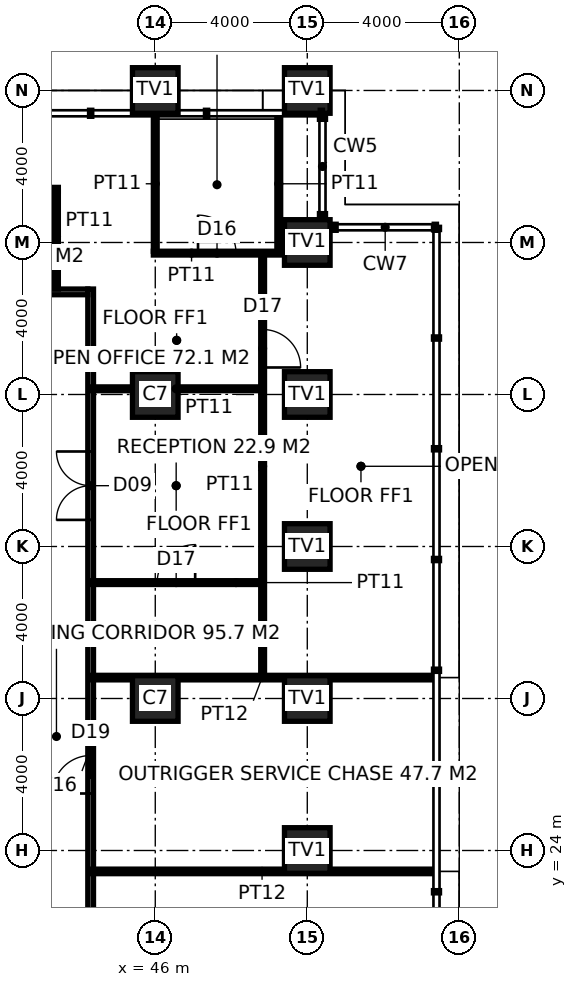
"""IFC4 building model, lengths in metres.
Left out: names, types, materials, properties, quantities, classifications, styles, units other than length and angle.
Written with IfcOpenShell. Run it as: python <this file> out.ifc"""

import sys

from ifc_helpers import new_model, si_unit, direction, frame, frame_2d, origin, origin_2d, place, context, subcontext, project, spatial, rectangle, hollow_rectangle, extrude, element, fill, save


model = new_model("IFC4")
c1 = context("Model", 3, precision=1e-05, world=origin(), true_north=direction((0.0, 1.0)))
c2 = subcontext(c1, "Body", "Model", "MODEL_VIEW")
j1 = project(units=[si_unit("LENGTHUNIT", "METRE"), si_unit("PLANEANGLEUNIT", "RADIAN")], contexts=[c1])
p1 = place(None, origin())
s1 = spatial("IfcSite", under=j1, at=p1, CompositionType="ELEMENT")
p2 = place(p1, origin())
s2 = spatial("IfcBuilding", under=s1, at=p2, CompositionType="ELEMENT")
p3 = place(p2, frame((0.0, 0.0, 11.0)))
s3 = spatial("IfcBuildingStorey", under=s2, at=p3, CompositionType="ELEMENT", Elevation=11.0)
for number, where, z_axis, x_axis in (
    (1, (46.0, 44.0, 0.0), (0.0, 0.0, 1.0), (1.0, 0.0, 0.0)),
    (2, (50.0, 44.0, 0.0), (0.0, 0.0, 1.0), (1.0, 0.0, 0.0)),
    (3, (50.0, 24.0, 0.0), (0.0, 0.0, 1.0), (1.0, 0.0, 0.0)),
    (4, (50.0, 28.0, 0.0), (0.0, 0.0, 1.0), (1.0, 0.0, 0.0)),
    (5, (50.0, 32.0, 0.0), (0.0, 0.0, 1.0), (1.0, 0.0, 0.0)),
    (6, (50.0, 36.0, 0.0), (0.0, 0.0, 1.0), (1.0, 0.0, 0.0)),
    (7, (50.0, 40.0, 0.0), (0.0, 0.0, 1.0), (1.0, 0.0, 0.0)),
):
    element("IfcColumn", number, at=place(p3, frame(where, z_axis=z_axis, x_axis=x_axis)), inside=s3, PredefinedType="USERDEFINED", context=c2, shape_type="SweptSolid", body=[
        extrude(hollow_rectangle(XDim=1.2, YDim=1.2, WallThickness=0.1, at=origin_2d()), origin(), (0.0, 0.0, 1.0), 4.0),
    ])
for number, where, z_axis, x_axis in (
    (8, (46.0, 28.0, 0.0), (0.0, 0.0, 1.0), (1.0, 0.0, 0.0)),
    (9, (46.0, 36.0, 0.0), (0.0, 0.0, 1.0), (1.0, 0.0, 0.0)),
):
    element("IfcColumn", number, at=place(p3, frame(where, z_axis=z_axis, x_axis=x_axis)), inside=s3, PredefinedType="COLUMN", context=c2, shape_type="SweptSolid", body=[
        extrude(hollow_rectangle(XDim=1.2, YDim=1.2, WallThickness=0.1, at=origin_2d()), origin(), (0.0, 0.0, 1.0), 4.0),
    ])
p4 = place(p3, frame((44.3, 14.625, 0.0), z_axis=(0.0, 0.0, 1.0), x_axis=(0.0, 1.0, 0.0)))
e10 = element("IfcWall", 10, at=p4, inside=s3, PredefinedType="PARTITIONING", context=c2, shape_type="SweptSolid", body=[
    extrude(rectangle(XDim=24.15, YDim=0.15, at=frame_2d((12.075, 0.0))), origin(), (0.0, 0.0, 1.0), 3.85),
])
p5 = place(p4, frame((2.824, 0.0, 0.0)))
e11 = element("IfcOpeningElement", 11, at=p5, cuts=e10, PredefinedType="OPENING", context=c2, shape_type="SweptSolid", body=[
    extrude(rectangle(XDim=1.8, YDim=2.4, at=frame_2d((0.9, 1.2))), frame((0.0, 0.085, 0.0), z_axis=(0.0, -1.0, 0.0), x_axis=(1.0, 0.0, 0.0)), (0.0, 0.0, 1.0), 0.17),
])
p6 = place(p4, frame((18.075, 0.0, 0.0)))
e12 = element("IfcOpeningElement", 12, at=p6, cuts=e10, PredefinedType="OPENING", context=c2, shape_type="SweptSolid", body=[
    extrude(rectangle(XDim=1.8, YDim=2.4, at=frame_2d((0.9, 1.2))), frame((0.0, 0.085, 0.0), z_axis=(0.0, -1.0, 0.0), x_axis=(1.0, 0.0, 0.0)), (0.0, 0.0, 1.0), 0.17),
])
p7 = place(p4, frame((10.875, 0.0, 0.0)))
e13 = element("IfcOpeningElement", 13, at=p7, cuts=e10, PredefinedType="OPENING", context=c2, shape_type="SweptSolid", body=[
    extrude(rectangle(XDim=1.0, YDim=2.2, at=frame_2d((0.5, 1.1))), frame((0.0, 0.085, 0.0), z_axis=(0.0, -1.0, 0.0), x_axis=(1.0, 0.0, 0.0)), (0.0, 0.0, 1.0), 0.17),
])
p8 = place(p3, frame((15.775, 38.7, 0.0), z_axis=(0.0, 0.0, 1.0), x_axis=(1.0, 0.0, 0.0)))
e14 = element("IfcWall", 14, at=p8, inside=s3, PredefinedType="PARTITIONING", context=c2, shape_type="SweptSolid", body=[
    extrude(rectangle(XDim=28.45, YDim=0.15, at=frame_2d((14.225, 0.0))), origin(), (0.0, 0.0, 1.0), 3.85),
])
p9 = place(p8, frame((7.975, 0.0, 0.0)))
e15 = element("IfcOpeningElement", 15, at=p9, cuts=e14, PredefinedType="OPENING", context=c2, shape_type="SweptSolid", body=[
    extrude(rectangle(XDim=0.9, YDim=2.1, at=frame_2d((0.45, 1.05))), frame((0.0, 0.085, 0.0), z_axis=(0.0, -1.0, 0.0), x_axis=(1.0, 0.0, 0.0)), (0.0, 0.0, 1.0), 0.17),
])
p10 = place(p8, frame((11.725, 0.0, 0.0)))
e16 = element("IfcOpeningElement", 16, at=p10, cuts=e14, PredefinedType="OPENING", context=c2, shape_type="SweptSolid", body=[
    extrude(rectangle(XDim=1.0, YDim=2.1, at=frame_2d((0.5, 1.05))), frame((0.0, 0.085, 0.0), z_axis=(0.0, -1.0, 0.0), x_axis=(1.0, 0.0, 0.0)), (0.0, 0.0, 1.0), 0.17),
])
p11 = place(p8, frame((15.575, 0.0, 0.0)))
e17 = element("IfcOpeningElement", 17, at=p11, cuts=e14, PredefinedType="OPENING", context=c2, shape_type="SweptSolid", body=[
    extrude(rectangle(XDim=0.9, YDim=2.1, at=frame_2d((0.45, 1.05))), frame((0.0, 0.085, 0.0), z_axis=(0.0, -1.0, 0.0), x_axis=(1.0, 0.0, 0.0)), (0.0, 0.0, 1.0), 0.17),
])
for number, where, z_axis, x_axis in (
    (18, (44.3, 23.45, 0.0), (0.0, 0.0, 1.0), (1.0, 0.0, 0.0)),
    (19, (44.3, 28.55, 0.0), (0.0, 0.0, 1.0), (1.0, 0.0, 0.0)),
):
    element("IfcWall", number, at=place(p3, frame(where, z_axis=z_axis, x_axis=x_axis)), inside=s3, PredefinedType="PARTITIONING", context=c2, shape_type="SweptSolid", body=[
        extrude(rectangle(XDim=9.02, YDim=0.12, at=frame_2d((4.51, 0.0))), origin(), (0.0, 0.0, 1.0), 3.85),
    ])
p12 = place(p3, frame((45.95, 39.72, 0.0), z_axis=(0.0, 0.0, 1.0), x_axis=(1.0, 0.0, 0.0)))
e20 = element("IfcWall", 20, at=p12, inside=s3, PredefinedType="PARTITIONING", context=c2, shape_type="SweptSolid", body=[
    extrude(rectangle(XDim=3.35, YDim=0.1, at=frame_2d((1.675, 0.0))), origin(), (0.0, 0.0, 1.0), 3.85),
])
p13 = place(p12, frame((1.175, 0.0, 0.0)))
e21 = element("IfcOpeningElement", 21, at=p13, cuts=e20, PredefinedType="OPENING", context=c2, shape_type="SweptSolid", body=[
    extrude(rectangle(XDim=1.0, YDim=2.2, at=frame_2d((0.5, 1.1))), frame((0.0, 0.06, 0.0), z_axis=(0.0, -1.0, 0.0), x_axis=(1.0, 0.0, 0.0)), (0.0, 0.0, 1.0), 0.12),
])
p14 = place(p3, frame((40.25, 41.4, 0.0), z_axis=(0.0, 0.0, 1.0), x_axis=(1.0, 0.0, 0.0)))
e22 = element("IfcWall", 22, at=p14, inside=s3, PredefinedType="PARTITIONING", context=c2, shape_type="SweptSolid", body=[
    extrude(rectangle(XDim=3.2, YDim=0.1, at=frame_2d((1.6, 0.0))), origin(), (0.0, 0.0, 1.0), 3.85),
])
p15 = place(p14, frame((1.1, 0.0, 0.0)))
e23 = element("IfcOpeningElement", 23, at=p15, cuts=e22, PredefinedType="OPENING", context=c2, shape_type="SweptSolid", body=[
    extrude(rectangle(XDim=1.0, YDim=2.2, at=frame_2d((0.5, 1.1))), frame((0.0, 0.06, 0.0), z_axis=(0.0, -1.0, 0.0), x_axis=(1.0, 0.0, 0.0)), (0.0, 0.0, 1.0), 0.12),
])
p16 = place(p3, frame((43.4, 38.775, 0.0), z_axis=(0.0, 0.0, 1.0), x_axis=(0.0, 1.0, 0.0)))
e24 = element("IfcWall", 24, at=p16, inside=s3, PredefinedType="PARTITIONING", context=c2, shape_type="SweptSolid", body=[
    extrude(rectangle(XDim=2.575, YDim=0.1, at=frame_2d((1.288, 0.0))), origin(), (0.0, 0.0, 1.0), 3.85),
])
p17 = place(p3, frame((46.0, 39.77, 0.0), z_axis=(0.0, 0.0, 1.0), x_axis=(0.0, 1.0, 0.0)))
e25 = element("IfcWall", 25, at=p17, inside=s3, PredefinedType="PARTITIONING", context=c2, shape_type="SweptSolid", body=[
    extrude(rectangle(XDim=3.55, YDim=0.1, at=frame_2d((1.775, 0.0))), origin(), (0.0, 0.0, 1.0), 2.85),
])
p18 = place(p3, frame((49.25, 39.77, 0.0), z_axis=(0.0, 0.0, 1.0), x_axis=(0.0, 1.0, 0.0)))
e26 = element("IfcWall", 26, at=p18, inside=s3, PredefinedType="PARTITIONING", context=c2, shape_type="SweptSolid", body=[
    extrude(rectangle(XDim=3.55, YDim=0.1, at=frame_2d((1.775, 0.0))), origin(), (0.0, 0.0, 1.0), 3.85),
])
p19 = place(p3, frame((48.825, 39.67, 0.0), z_axis=(0.0, 0.0, 1.0), x_axis=(0.0, -1.0, 0.0)))
e27 = element("IfcWall", 27, at=p19, inside=s3, PredefinedType="PARTITIONING", context=c2, shape_type="SweptSolid", body=[
    extrude(rectangle(XDim=11.119, YDim=0.1, at=frame_2d((5.56, 0.0))), origin(), (0.0, 0.0, 1.0), 3.85),
])
p20 = place(p19, frame((1.959, 0.0, 0.0)))
e28 = element("IfcOpeningElement", 28, at=p20, cuts=e27, PredefinedType="OPENING", context=c2, shape_type="SweptSolid", body=[
    extrude(rectangle(XDim=1.0, YDim=2.2, at=frame_2d((0.5, 1.1))), frame((0.0, 0.06, 0.0), z_axis=(0.0, -1.0, 0.0), x_axis=(1.0, 0.0, 0.0)), (0.0, 0.0, 1.0), 0.12),
])
p21 = place(p3, frame((44.3, 31.05, 0.0), z_axis=(0.0, 0.0, 1.0), x_axis=(1.0, 0.0, 0.0)))
e29 = element("IfcWall", 29, at=p21, inside=s3, PredefinedType="PARTITIONING", context=c2, shape_type="SweptSolid", body=[
    extrude(rectangle(XDim=4.5, YDim=0.1, at=frame_2d((2.25, 0.0))), origin(), (0.0, 0.0, 1.0), 3.85),
])
p22 = place(p21, frame((1.75, 0.0, 0.0)))
e30 = element("IfcOpeningElement", 30, at=p22, cuts=e29, PredefinedType="OPENING", context=c2, shape_type="SweptSolid", body=[
    extrude(rectangle(XDim=1.0, YDim=2.2, at=frame_2d((0.5, 1.1))), frame((0.0, 0.06, 0.0), z_axis=(0.0, -1.0, 0.0), x_axis=(1.0, 0.0, 0.0)), (0.0, 0.0, 1.0), 0.12),
])
p23 = place(p3, frame((48.8, 36.15, 0.0), z_axis=(0.0, 0.0, 1.0), x_axis=(-1.0, 0.0, 0.0)))
e31 = element("IfcWall", 31, at=p23, inside=s3, PredefinedType="PARTITIONING", context=c2, shape_type="SweptSolid", body=[
    extrude(rectangle(XDim=4.5, YDim=0.1, at=frame_2d((2.25, 0.0))), origin(), (0.0, 0.0, 1.0), 2.85),
])
p24 = place(p6, origin())
e32 = element("IfcDoor", 32, at=p24, inside=s3, OperationType="DOUBLE_DOOR_DOUBLE_SWING", PredefinedType="DOOR", context=c2, shape_type="SweptSolid", body=[
    extrude(rectangle(XDim=1.8, YDim=2.4, at=frame_2d((0.9, 1.2))), frame((0.0, 0.025, 0.0), z_axis=(0.0, -1.0, 0.0), x_axis=(1.0, 0.0, 0.0)), (0.0, 0.0, 1.0), 0.05),
])
fill(e12, e32)
p25 = place(p7, origin())
e33 = element("IfcDoor", 33, at=p25, inside=s3, OperationType="SINGLE_SWING_LEFT", PredefinedType="DOOR", context=c2, shape_type="SweptSolid", body=[
    extrude(rectangle(XDim=1.0, YDim=2.2, at=frame_2d((0.5, 1.1))), frame((0.0, 0.025, 0.0), z_axis=(0.0, -1.0, 0.0), x_axis=(1.0, 0.0, 0.0)), (0.0, 0.0, 1.0), 0.05),
])
fill(e13, e33)
p26 = place(p13, origin())
e34 = element("IfcDoor", 34, at=p26, inside=s3, OperationType="SINGLE_SWING_LEFT", PredefinedType="DOOR", context=c2, shape_type="SweptSolid", body=[
    extrude(rectangle(XDim=1.0, YDim=2.2, at=frame_2d((0.5, 1.1))), frame((0.0, 0.025, 0.0), z_axis=(0.0, -1.0, 0.0), x_axis=(1.0, 0.0, 0.0)), (0.0, 0.0, 1.0), 0.05),
])
fill(e21, e34)
p27 = place(p20, origin())
e35 = element("IfcDoor", 35, at=p27, inside=s3, OperationType="SINGLE_SWING_RIGHT", PredefinedType="DOOR", context=c2, shape_type="SweptSolid", body=[
    extrude(rectangle(XDim=1.0, YDim=2.2, at=frame_2d((0.5, 1.1))), frame((0.0, 0.025, 0.0), z_axis=(0.0, -1.0, 0.0), x_axis=(1.0, 0.0, 0.0)), (0.0, 0.0, 1.0), 0.05),
])
fill(e28, e35)
p28 = place(p22, origin())
e36 = element("IfcDoor", 36, at=p28, inside=s3, OperationType="SINGLE_SWING_RIGHT", PredefinedType="DOOR", context=c2, shape_type="SweptSolid", body=[
    extrude(rectangle(XDim=1.0, YDim=2.2, at=frame_2d((0.5, 1.1))), frame((0.0, 0.025, 0.0), z_axis=(0.0, -1.0, 0.0), x_axis=(1.0, 0.0, 0.0)), (0.0, 0.0, 1.0), 0.05),
])
fill(e30, e36)
save(model, sys.argv[1])
